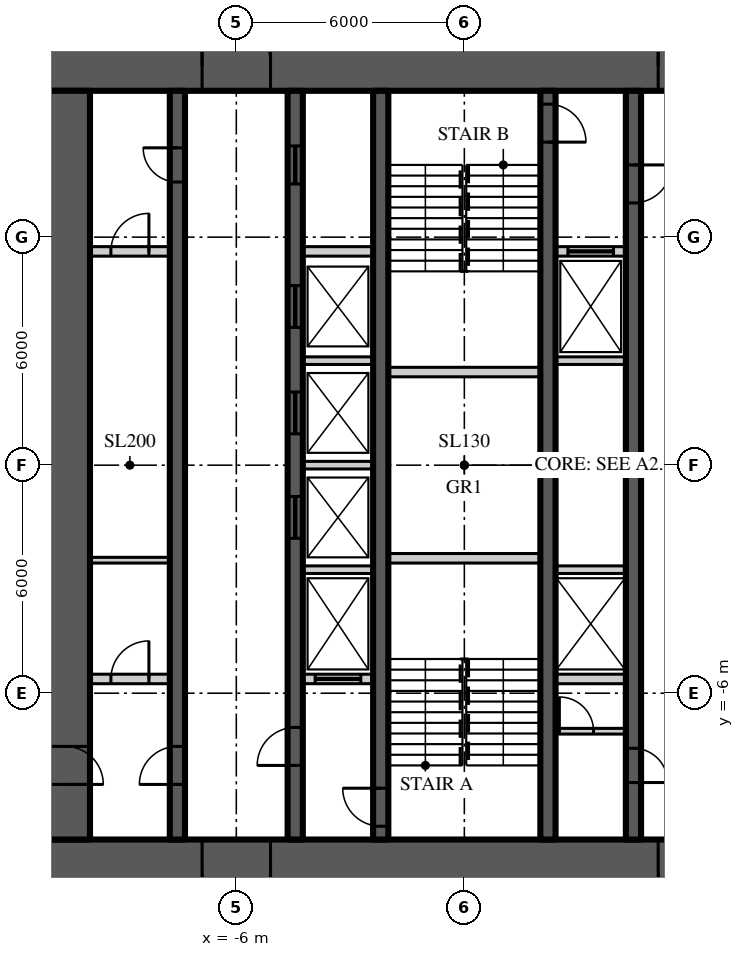
"""IFC4 building model, lengths in metres.
Left out: names, types, materials, properties, quantities, classifications, styles, units other than length and angle.
Written with IfcOpenShell. Run it as: python <this file> out.ifc"""

import sys

from ifc_helpers import new_model, si_unit, direction, frame, frame_2d, origin, place, context, subcontext, project, spatial, rectangle, extrude, element, fill, save


model = new_model("IFC4")
c1 = context("Model", 3, precision=1e-05, world=origin(), true_north=direction((0.0, 1.0)))
c2 = subcontext(c1, "Body", "Model", "MODEL_VIEW")
j1 = project(units=[si_unit("LENGTHUNIT", "METRE"), si_unit("PLANEANGLEUNIT", "RADIAN")], contexts=[c1])
p1 = place(None, origin())
s1 = spatial("IfcSite", under=j1, at=p1, CompositionType="ELEMENT")
p2 = place(p1, origin())
s2 = spatial("IfcBuilding", under=s1, at=p2, CompositionType="ELEMENT")
p3 = place(p2, frame((0.0, 0.0, 128.1)))
s3 = spatial("IfcBuildingStorey", under=s2, at=p3, CompositionType="ELEMENT", Elevation=128.1)
p4 = place(p3, frame((-11.15, 10.5, 0.0), z_axis=(0.0, 0.0, 1.0), x_axis=(1.0, 0.0, 0.0)))
e1 = element("IfcWall", 1, at=p4, inside=s3, PredefinedType="SHEAR", context=c2, shape_type="SweptSolid", body=[
    extrude(rectangle(XDim=22.3, YDim=1.3, at=frame_2d((11.15, 0.0))), origin(), (0.0, 0.0, 1.0), 3.9),
])
p5 = place(p4, frame((4.25, 0.0, 0.0)))
e2 = element("IfcOpeningElement", 2, at=p5, cuts=e1, PredefinedType="OPENING", context=c2, shape_type="SweptSolid", body=[
    extrude(rectangle(XDim=1.8, YDim=2.2, at=frame_2d((0.9, 1.1))), frame((0.0, 0.66, 0.0), z_axis=(0.0, -1.0, 0.0), x_axis=(1.0, 0.0, 0.0)), (0.0, 0.0, 1.0), 1.32),
])
p6 = place(p4, frame((16.25, 0.0, 0.0)))
e3 = element("IfcOpeningElement", 3, at=p6, cuts=e1, PredefinedType="OPENING", context=c2, shape_type="SweptSolid", body=[
    extrude(rectangle(XDim=1.8, YDim=2.2, at=frame_2d((0.9, 1.1))), frame((0.0, 0.66, 0.0), z_axis=(0.0, -1.0, 0.0), x_axis=(1.0, 0.0, 0.0)), (0.0, 0.0, 1.0), 1.32),
])
p7 = place(p3, frame((11.15, -10.5, 0.0), z_axis=(0.0, 0.0, 1.0), x_axis=(-1.0, 0.0, 0.0)))
e4 = element("IfcWall", 4, at=p7, inside=s3, PredefinedType="SHEAR", context=c2, shape_type="SweptSolid", body=[
    extrude(rectangle(XDim=22.3, YDim=1.3, at=frame_2d((11.15, 0.0))), origin(), (0.0, 0.0, 1.0), 3.9),
])
p8 = place(p7, frame((16.25, 0.0, 0.0)))
e5 = element("IfcOpeningElement", 5, at=p8, cuts=e4, PredefinedType="OPENING", context=c2, shape_type="SweptSolid", body=[
    extrude(rectangle(XDim=1.8, YDim=2.2, at=frame_2d((0.9, 1.1))), frame((0.0, 0.66, 0.0), z_axis=(0.0, -1.0, 0.0), x_axis=(1.0, 0.0, 0.0)), (0.0, 0.0, 1.0), 1.32),
])
p9 = place(p7, frame((4.25, 0.0, 0.0)))
e6 = element("IfcOpeningElement", 6, at=p9, cuts=e4, PredefinedType="OPENING", context=c2, shape_type="SweptSolid", body=[
    extrude(rectangle(XDim=1.8, YDim=2.2, at=frame_2d((0.9, 1.1))), frame((0.0, 0.66, 0.0), z_axis=(0.0, -1.0, 0.0), x_axis=(1.0, 0.0, 0.0)), (0.0, 0.0, 1.0), 1.32),
])
p10 = place(p3, frame((-10.5, 9.85, 0.0), z_axis=(0.0, 0.0, 1.0), x_axis=(0.0, -1.0, 0.0)))
e7 = element("IfcWall", 7, at=p10, inside=s3, PredefinedType="SHEAR", context=c2, shape_type="SweptSolid", body=[
    extrude(rectangle(XDim=19.7, YDim=1.3, at=frame_2d((9.85, 0.0))), origin(), (0.0, 0.0, 1.0), 3.9),
])
p11 = place(p10, frame((17.25, 0.0, 0.0)))
e8 = element("IfcOpeningElement", 8, at=p11, cuts=e7, PredefinedType="OPENING", context=c2, shape_type="SweptSolid", body=[
    extrude(rectangle(XDim=1.0, YDim=2.2, at=frame_2d((0.5, 1.1))), frame((0.0, 0.66, 0.0), z_axis=(0.0, -1.0, 0.0), x_axis=(1.0, 0.0, 0.0)), (0.0, 0.0, 1.0), 1.32),
])
p12 = place(p3, frame((-7.55, -9.85, 0.0), z_axis=(0.0, 0.0, 1.0), x_axis=(0.0, 1.0, 0.0)))
e9 = element("IfcWall", 9, at=p12, inside=s3, PredefinedType="SHEAR", context=c2, shape_type="SweptSolid", body=[
    extrude(rectangle(XDim=19.7, YDim=0.4, at=frame_2d((9.85, 0.0))), origin(), (0.0, 0.0, 1.0), 3.9),
])
p13 = place(p12, frame((1.45, 0.0, 0.0)))
e10 = element("IfcOpeningElement", 10, at=p13, cuts=e9, PredefinedType="OPENING", context=c2, shape_type="SweptSolid", body=[
    extrude(rectangle(XDim=1.0, YDim=2.2, at=frame_2d((0.5, 1.1))), frame((0.0, 0.21, 0.0), z_axis=(0.0, -1.0, 0.0), x_axis=(1.0, 0.0, 0.0)), (0.0, 0.0, 1.0), 0.42),
])
p14 = place(p12, frame((17.3, 0.0, 0.0)))
e11 = element("IfcOpeningElement", 11, at=p14, cuts=e9, PredefinedType="OPENING", context=c2, shape_type="SweptSolid", body=[
    extrude(rectangle(XDim=0.9, YDim=2.1, at=frame_2d((0.45, 1.05))), frame((0.0, 0.21, 0.0), z_axis=(0.0, -1.0, 0.0), x_axis=(1.0, 0.0, 0.0)), (0.0, 0.0, 1.0), 0.42),
])
p15 = place(p3, frame((-4.45, -9.85, 0.0), z_axis=(0.0, 0.0, 1.0), x_axis=(0.0, 1.0, 0.0)))
e12 = element("IfcWall", 12, at=p15, inside=s3, PredefinedType="SHEAR", context=c2, shape_type="SweptSolid", body=[
    extrude(rectangle(XDim=19.7, YDim=0.4, at=frame_2d((9.85, 0.0))), origin(), (0.0, 0.0, 1.0), 3.9),
])
p16 = place(p15, frame((1.95, 0.0, 0.0)))
e13 = element("IfcOpeningElement", 13, at=p16, cuts=e12, PredefinedType="OPENING", context=c2, shape_type="SweptSolid", body=[
    extrude(rectangle(XDim=1.0, YDim=2.2, at=frame_2d((0.5, 1.1))), frame((0.0, 0.21, 0.0), z_axis=(0.0, -1.0, 0.0), x_axis=(1.0, 0.0, 0.0)), (0.0, 0.0, 1.0), 0.42),
])
p17 = place(p15, frame((17.25, 0.0, 0.0)))
e14 = element("IfcOpeningElement", 14, at=p17, cuts=e12, PredefinedType="OPENING", context=c2, shape_type="SweptSolid", body=[
    extrude(rectangle(XDim=1.0, YDim=2.1, at=frame_2d((0.5, 1.05))), frame((0.0, 0.21, 0.0), z_axis=(0.0, -1.0, 0.0), x_axis=(1.0, 0.0, 0.0)), (0.0, 0.0, 1.0), 0.42),
])
p18 = place(p15, frame((7.925, 0.0, 0.0)))
e15 = element("IfcOpeningElement", 15, at=p18, cuts=e12, PredefinedType="OPENING", context=c2, shape_type="SweptSolid", body=[
    extrude(rectangle(XDim=1.1, YDim=2.2, at=frame_2d((0.55, 1.1))), frame((0.0, 0.21, 0.0), z_axis=(0.0, -1.0, 0.0), x_axis=(1.0, 0.0, 0.0)), (0.0, 0.0, 1.0), 0.42),
])
p19 = place(p15, frame((10.675, 0.0, 0.0)))
e16 = element("IfcOpeningElement", 16, at=p19, cuts=e12, PredefinedType="OPENING", context=c2, shape_type="SweptSolid", body=[
    extrude(rectangle(XDim=1.1, YDim=2.2, at=frame_2d((0.55, 1.1))), frame((0.0, 0.21, 0.0), z_axis=(0.0, -1.0, 0.0), x_axis=(1.0, 0.0, 0.0)), (0.0, 0.0, 1.0), 0.42),
])
p20 = place(p15, frame((13.475, 0.0, 0.0)))
e17 = element("IfcOpeningElement", 17, at=p20, cuts=e12, PredefinedType="OPENING", context=c2, shape_type="SweptSolid", body=[
    extrude(rectangle(XDim=1.1, YDim=2.2, at=frame_2d((0.55, 1.1))), frame((0.0, 0.21, 0.0), z_axis=(0.0, -1.0, 0.0), x_axis=(1.0, 0.0, 0.0)), (0.0, 0.0, 1.0), 0.42),
])
p21 = place(p3, frame((4.45, 9.85, 0.0), z_axis=(0.0, 0.0, 1.0), x_axis=(0.0, -1.0, 0.0)))
e18 = element("IfcWall", 18, at=p21, inside=s3, PredefinedType="SHEAR", context=c2, shape_type="SweptSolid", body=[
    extrude(rectangle(XDim=19.7, YDim=0.4, at=frame_2d((9.85, 0.0))), origin(), (0.0, 0.0, 1.0), 3.9),
])
p22 = place(p21, frame((1.95, 0.0, 0.0)))
e19 = element("IfcOpeningElement", 19, at=p22, cuts=e18, PredefinedType="OPENING", context=c2, shape_type="SweptSolid", body=[
    extrude(rectangle(XDim=1.0, YDim=2.2, at=frame_2d((0.5, 1.1))), frame((0.0, 0.21, 0.0), z_axis=(0.0, -1.0, 0.0), x_axis=(1.0, 0.0, 0.0)), (0.0, 0.0, 1.0), 0.42),
])
p23 = place(p21, frame((17.3, 0.0, 0.0)))
e20 = element("IfcOpeningElement", 20, at=p23, cuts=e18, PredefinedType="OPENING", context=c2, shape_type="SweptSolid", body=[
    extrude(rectangle(XDim=0.9, YDim=2.1, at=frame_2d((0.45, 1.05))), frame((0.0, 0.21, 0.0), z_axis=(0.0, -1.0, 0.0), x_axis=(1.0, 0.0, 0.0)), (0.0, 0.0, 1.0), 0.42),
])
p24 = place(p3, frame((-2.2, -9.85, 0.0), z_axis=(0.0, 0.0, 1.0), x_axis=(0.0, 1.0, 0.0)))
e21 = element("IfcWall", 21, at=p24, inside=s3, PredefinedType="SHEAR", context=c2, shape_type="SweptSolid", body=[
    extrude(rectangle(XDim=19.7, YDim=0.4, at=frame_2d((9.85, 0.0))), origin(), (0.0, 0.0, 1.0), 3.9),
])
p25 = place(p24, frame((0.35, 0.0, 0.0)))
e22 = element("IfcOpeningElement", 22, at=p25, cuts=e21, PredefinedType="OPENING", context=c2, shape_type="SweptSolid", body=[
    extrude(rectangle(XDim=1.0, YDim=2.2, at=frame_2d((0.5, 1.1))), frame((0.0, 0.21, 0.0), z_axis=(0.0, -1.0, 0.0), x_axis=(1.0, 0.0, 0.0)), (0.0, 0.0, 1.0), 0.42),
])
p26 = place(p3, frame((2.2, 9.85, 0.0), z_axis=(0.0, 0.0, 1.0), x_axis=(0.0, -1.0, 0.0)))
e23 = element("IfcWall", 23, at=p26, inside=s3, PredefinedType="SHEAR", context=c2, shape_type="SweptSolid", body=[
    extrude(rectangle(XDim=19.7, YDim=0.4, at=frame_2d((9.85, 0.0))), origin(), (0.0, 0.0, 1.0), 3.9),
])
p27 = place(p26, frame((0.35, 0.0, 0.0)))
e24 = element("IfcOpeningElement", 24, at=p27, cuts=e23, PredefinedType="OPENING", context=c2, shape_type="SweptSolid", body=[
    extrude(rectangle(XDim=1.0, YDim=2.2, at=frame_2d((0.5, 1.1))), frame((0.0, 0.21, 0.0), z_axis=(0.0, -1.0, 0.0), x_axis=(1.0, 0.0, 0.0)), (0.0, 0.0, 1.0), 0.42),
])
p28 = place(p3, frame((-9.85, 5.625, 0.0), z_axis=(0.0, 0.0, 1.0), x_axis=(1.0, 0.0, 0.0)))
e25 = element("IfcWall", 25, at=p28, inside=s3, PredefinedType="SOLIDWALL", context=c2, shape_type="SweptSolid", body=[
    extrude(rectangle(XDim=2.1, YDim=0.25, at=frame_2d((1.05, 0.0))), origin(), (0.0, 0.0, 1.0), 3.7),
])
p29 = place(p28, frame((0.55, 0.0, 0.0)))
e26 = element("IfcOpeningElement", 26, at=p29, cuts=e25, PredefinedType="OPENING", context=c2, shape_type="SweptSolid", body=[
    extrude(rectangle(XDim=1.0, YDim=2.2, at=frame_2d((0.5, 1.1))), frame((0.0, 0.135, 0.0), z_axis=(0.0, -1.0, 0.0), x_axis=(1.0, 0.0, 0.0)), (0.0, 0.0, 1.0), 0.27),
])
p30 = place(p3, frame((-4.25, 5.625, 0.0), z_axis=(0.0, 0.0, 1.0), x_axis=(1.0, 0.0, 0.0)))
e27 = element("IfcWall", 27, at=p30, inside=s3, PredefinedType="SOLIDWALL", context=c2, shape_type="SweptSolid", body=[
    extrude(rectangle(XDim=1.85, YDim=0.25, at=frame_2d((0.925, 0.0))), origin(), (0.0, 0.0, 1.0), 3.7),
])
p31 = place(p3, frame((2.4, 5.625, 0.0), z_axis=(0.0, 0.0, 1.0), x_axis=(1.0, 0.0, 0.0)))
e28 = element("IfcWall", 28, at=p31, inside=s3, PredefinedType="SOLIDWALL", context=c2, shape_type="SweptSolid", body=[
    extrude(rectangle(XDim=1.85, YDim=0.25, at=frame_2d((0.925, 0.0))), origin(), (0.0, 0.0, 1.0), 3.7),
])
p32 = place(p31, frame((0.325, 0.0, 0.0)))
e29 = element("IfcOpeningElement", 29, at=p32, cuts=e28, PredefinedType="OPENING", context=c2, shape_type="SweptSolid", body=[
    extrude(rectangle(XDim=1.2, YDim=2.2, at=frame_2d((0.6, 1.1))), frame((0.0, 0.135, 0.0), z_axis=(0.0, -1.0, 0.0), x_axis=(1.0, 0.0, 0.0)), (0.0, 0.0, 1.0), 0.27),
])
p33 = place(p3, frame((-9.85, -5.625, 0.0), z_axis=(0.0, 0.0, 1.0), x_axis=(1.0, 0.0, 0.0)))
e30 = element("IfcWall", 30, at=p33, inside=s3, PredefinedType="SOLIDWALL", context=c2, shape_type="SweptSolid", body=[
    extrude(rectangle(XDim=2.1, YDim=0.25, at=frame_2d((1.05, 0.0))), origin(), (0.0, 0.0, 1.0), 3.7),
])
p34 = place(p33, frame((0.55, 0.0, 0.0)))
e31 = element("IfcOpeningElement", 31, at=p34, cuts=e30, PredefinedType="OPENING", context=c2, shape_type="SweptSolid", body=[
    extrude(rectangle(XDim=1.0, YDim=2.2, at=frame_2d((0.5, 1.1))), frame((0.0, 0.135, 0.0), z_axis=(0.0, -1.0, 0.0), x_axis=(1.0, 0.0, 0.0)), (0.0, 0.0, 1.0), 0.27),
])
p35 = place(p3, frame((-4.25, -5.625, 0.0), z_axis=(0.0, 0.0, 1.0), x_axis=(1.0, 0.0, 0.0)))
e32 = element("IfcWall", 32, at=p35, inside=s3, PredefinedType="SOLIDWALL", context=c2, shape_type="SweptSolid", body=[
    extrude(rectangle(XDim=1.85, YDim=0.25, at=frame_2d((0.925, 0.0))), origin(), (0.0, 0.0, 1.0), 3.7),
])
p36 = place(p35, frame((0.325, 0.0, 0.0)))
e33 = element("IfcOpeningElement", 33, at=p36, cuts=e32, PredefinedType="OPENING", context=c2, shape_type="SweptSolid", body=[
    extrude(rectangle(XDim=1.2, YDim=2.2, at=frame_2d((0.6, 1.1))), frame((0.0, 0.135, 0.0), z_axis=(0.0, -1.0, 0.0), x_axis=(1.0, 0.0, 0.0)), (0.0, 0.0, 1.0), 0.27),
])
p37 = place(p3, frame((2.4, -5.625, 0.0), z_axis=(0.0, 0.0, 1.0), x_axis=(1.0, 0.0, 0.0)))
e34 = element("IfcWall", 34, at=p37, inside=s3, PredefinedType="SOLIDWALL", context=c2, shape_type="SweptSolid", body=[
    extrude(rectangle(XDim=1.85, YDim=0.25, at=frame_2d((0.925, 0.0))), origin(), (0.0, 0.0, 1.0), 3.7),
])
for number, where, z_axis, x_axis in (
    (35, (-2.0, -2.45, 0.0), (0.0, 0.0, 1.0), (1.0, 0.0, 0.0)),
    (36, (-2.0, 2.45, 0.0), (0.0, 0.0, 1.0), (1.0, 0.0, 0.0)),
):
    element("IfcWall", number, at=place(p3, frame(where, z_axis=z_axis, x_axis=x_axis)), inside=s3, PredefinedType="SOLIDWALL", context=c2, shape_type="SweptSolid", body=[
        extrude(rectangle(XDim=4.0, YDim=0.25, at=frame_2d((2.0, 0.0))), origin(), (0.0, 0.0, 1.0), 3.7),
    ])
for number, where, z_axis, x_axis in (
    (37, (-4.25, -2.75, 0.0), (0.0, 0.0, 1.0), (1.0, 0.0, 0.0)),
    (38, (2.4, -2.75, 0.0), (0.0, 0.0, 1.0), (1.0, 0.0, 0.0)),
    (39, (-4.25, 0.0, 0.0), (0.0, 0.0, 1.0), (1.0, 0.0, 0.0)),
    (40, (-4.25, 2.75, 0.0), (0.0, 0.0, 1.0), (1.0, 0.0, 0.0)),
    (41, (2.4, 2.75, 0.0), (0.0, 0.0, 1.0), (1.0, 0.0, 0.0)),
):
    element("IfcWall", number, at=place(p3, frame(where, z_axis=z_axis, x_axis=x_axis)), inside=s3, PredefinedType="SOLIDWALL", context=c2, shape_type="SweptSolid", body=[
        extrude(rectangle(XDim=1.85, YDim=0.2, at=frame_2d((0.925, 0.0))), origin(), (0.0, 0.0, 1.0), 3.7),
    ])
p38 = place(p3, frame((-9.85, -2.5, 0.0), z_axis=(0.0, 0.0, 1.0), x_axis=(1.0, 0.0, 0.0)))
e42 = element("IfcWall", 42, at=p38, inside=s3, PredefinedType="SOLIDWALL", context=c2, shape_type="SweptSolid", body=[
    extrude(rectangle(XDim=2.1, YDim=0.15, at=frame_2d((1.05, 0.0))), origin(), (0.0, 0.0, 1.0), 3.77),
])
p39 = place(p3, frame((2.4, -7.0, 0.0), z_axis=(0.0, 0.0, 1.0), x_axis=(1.0, 0.0, 0.0)))
e43 = element("IfcWall", 43, at=p39, inside=s3, PredefinedType="SOLIDWALL", context=c2, shape_type="SweptSolid", body=[
    extrude(rectangle(XDim=1.85, YDim=0.15, at=frame_2d((0.925, 0.0))), origin(), (0.0, 0.0, 1.0), 3.77),
])
p40 = place(p39, frame((0.1, 0.0, 0.0)))
e44 = element("IfcOpeningElement", 44, at=p40, cuts=e43, PredefinedType="OPENING", context=c2, shape_type="SweptSolid", body=[
    extrude(rectangle(XDim=0.9, YDim=2.1, at=frame_2d((0.45, 1.05))), frame((0.0, 0.085, 0.0), z_axis=(0.0, -1.0, 0.0), x_axis=(1.0, 0.0, 0.0)), (0.0, 0.0, 1.0), 0.17),
])
p41 = place(p5, origin())
e45 = element("IfcDoor", 45, at=p41, inside=s3, OperationType="DOUBLE_DOOR_DOUBLE_SWING", PredefinedType="DOOR", context=c2, shape_type="SweptSolid", body=[
    extrude(rectangle(XDim=1.8, YDim=2.2, at=frame_2d((0.9, 1.1))), frame((0.0, 0.025, 0.0), z_axis=(0.0, -1.0, 0.0), x_axis=(1.0, 0.0, 0.0)), (0.0, 0.0, 1.0), 0.05),
])
fill(e2, e45)
p42 = place(p8, origin())
e46 = element("IfcDoor", 46, at=p42, inside=s3, OperationType="DOUBLE_DOOR_DOUBLE_SWING", PredefinedType="DOOR", context=c2, shape_type="SweptSolid", body=[
    extrude(rectangle(XDim=1.8, YDim=2.2, at=frame_2d((0.9, 1.1))), frame((0.0, 0.025, 0.0), z_axis=(0.0, -1.0, 0.0), x_axis=(1.0, 0.0, 0.0)), (0.0, 0.0, 1.0), 0.05),
])
fill(e5, e46)
p43 = place(p6, origin())
e47 = element("IfcDoor", 47, at=p43, inside=s3, OperationType="DOUBLE_DOOR_DOUBLE_SWING", PredefinedType="DOOR", context=c2, shape_type="SweptSolid", body=[
    extrude(rectangle(XDim=1.8, YDim=2.2, at=frame_2d((0.9, 1.1))), frame((0.0, 0.025, 0.0), z_axis=(0.0, -1.0, 0.0), x_axis=(1.0, 0.0, 0.0)), (0.0, 0.0, 1.0), 0.05),
])
fill(e3, e47)
p44 = place(p9, origin())
e48 = element("IfcDoor", 48, at=p44, inside=s3, OperationType="DOUBLE_DOOR_DOUBLE_SWING", PredefinedType="DOOR", context=c2, shape_type="SweptSolid", body=[
    extrude(rectangle(XDim=1.8, YDim=2.2, at=frame_2d((0.9, 1.1))), frame((0.0, 0.025, 0.0), z_axis=(0.0, -1.0, 0.0), x_axis=(1.0, 0.0, 0.0)), (0.0, 0.0, 1.0), 0.05),
])
fill(e6, e48)
p45 = place(p13, origin())
e49 = element("IfcDoor", 49, at=p45, inside=s3, OperationType="SINGLE_SWING_LEFT", PredefinedType="DOOR", context=c2, shape_type="SweptSolid", body=[
    extrude(rectangle(XDim=1.0, YDim=2.2, at=frame_2d((0.5, 1.1))), frame((0.0, 0.025, 0.0), z_axis=(0.0, -1.0, 0.0), x_axis=(1.0, 0.0, 0.0)), (0.0, 0.0, 1.0), 0.05),
])
fill(e10, e49)
p46 = place(p11, origin())
e50 = element("IfcDoor", 50, at=p46, inside=s3, OperationType="SINGLE_SWING_RIGHT", PredefinedType="DOOR", context=c2, shape_type="SweptSolid", body=[
    extrude(rectangle(XDim=1.0, YDim=2.2, at=frame_2d((0.5, 1.1))), frame((0.0, 0.025, 0.0), z_axis=(0.0, -1.0, 0.0), x_axis=(1.0, 0.0, 0.0)), (0.0, 0.0, 1.0), 0.05),
])
fill(e8, e50)
p47 = place(p16, origin())
e51 = element("IfcDoor", 51, at=p47, inside=s3, OperationType="SINGLE_SWING_LEFT", PredefinedType="DOOR", context=c2, shape_type="SweptSolid", body=[
    extrude(rectangle(XDim=1.0, YDim=2.2, at=frame_2d((0.5, 1.1))), frame((0.0, 0.025, 0.0), z_axis=(0.0, -1.0, 0.0), x_axis=(1.0, 0.0, 0.0)), (0.0, 0.0, 1.0), 0.05),
])
fill(e13, e51)
p48 = place(p25, origin())
e52 = element("IfcDoor", 52, at=p48, inside=s3, OperationType="SINGLE_SWING_RIGHT", PredefinedType="DOOR", context=c2, shape_type="SweptSolid", body=[
    extrude(rectangle(XDim=1.0, YDim=2.2, at=frame_2d((0.5, 1.1))), frame((0.0, 0.025, 0.0), z_axis=(0.0, -1.0, 0.0), x_axis=(1.0, 0.0, 0.0)), (0.0, 0.0, 1.0), 0.05),
])
fill(e22, e52)
p49 = place(p22, origin())
e53 = element("IfcDoor", 53, at=p49, inside=s3, OperationType="SINGLE_SWING_LEFT", PredefinedType="DOOR", context=c2, shape_type="SweptSolid", body=[
    extrude(rectangle(XDim=1.0, YDim=2.2, at=frame_2d((0.5, 1.1))), frame((0.0, 0.025, 0.0), z_axis=(0.0, -1.0, 0.0), x_axis=(1.0, 0.0, 0.0)), (0.0, 0.0, 1.0), 0.05),
])
fill(e19, e53)
p50 = place(p27, origin())
e54 = element("IfcDoor", 54, at=p50, inside=s3, OperationType="SINGLE_SWING_RIGHT", PredefinedType="DOOR", context=c2, shape_type="SweptSolid", body=[
    extrude(rectangle(XDim=1.0, YDim=2.2, at=frame_2d((0.5, 1.1))), frame((0.0, 0.025, 0.0), z_axis=(0.0, -1.0, 0.0), x_axis=(1.0, 0.0, 0.0)), (0.0, 0.0, 1.0), 0.05),
])
fill(e24, e54)
p51 = place(p14, origin())
e55 = element("IfcDoor", 55, at=p51, inside=s3, OperationType="SINGLE_SWING_RIGHT", PredefinedType="DOOR", context=c2, shape_type="SweptSolid", body=[
    extrude(rectangle(XDim=0.9, YDim=2.1, at=frame_2d((0.45, 1.05))), frame((0.0, 0.025, 0.0), z_axis=(0.0, -1.0, 0.0), x_axis=(1.0, 0.0, 0.0)), (0.0, 0.0, 1.0), 0.05),
])
fill(e11, e55)
p52 = place(p17, origin())
e56 = element("IfcDoor", 56, at=p52, inside=s3, OperationType="SLIDING_TO_LEFT", PredefinedType="DOOR", context=c2, shape_type="SweptSolid", body=[
    extrude(rectangle(XDim=1.0, YDim=2.1, at=frame_2d((0.5, 1.05))), frame((0.0, 0.025, 0.0), z_axis=(0.0, -1.0, 0.0), x_axis=(1.0, 0.0, 0.0)), (0.0, 0.0, 1.0), 0.05),
])
fill(e14, e56)
p53 = place(p23, origin())
e57 = element("IfcDoor", 57, at=p53, inside=s3, OperationType="SINGLE_SWING_RIGHT", PredefinedType="DOOR", context=c2, shape_type="SweptSolid", body=[
    extrude(rectangle(XDim=0.9, YDim=2.1, at=frame_2d((0.45, 1.05))), frame((0.0, 0.025, 0.0), z_axis=(0.0, -1.0, 0.0), x_axis=(1.0, 0.0, 0.0)), (0.0, 0.0, 1.0), 0.05),
])
fill(e20, e57)
p54 = place(p18, origin())
e58 = element("IfcDoor", 58, at=p54, inside=s3, OperationType="SLIDING_TO_LEFT", PredefinedType="DOOR", context=c2, shape_type="SweptSolid", body=[
    extrude(rectangle(XDim=1.1, YDim=2.2, at=frame_2d((0.55, 1.1))), frame((0.0, 0.025, 0.0), z_axis=(0.0, -1.0, 0.0), x_axis=(1.0, 0.0, 0.0)), (0.0, 0.0, 1.0), 0.05),
])
fill(e15, e58)
p55 = place(p19, origin())
e59 = element("IfcDoor", 59, at=p55, inside=s3, OperationType="SLIDING_TO_LEFT", PredefinedType="DOOR", context=c2, shape_type="SweptSolid", body=[
    extrude(rectangle(XDim=1.1, YDim=2.2, at=frame_2d((0.55, 1.1))), frame((0.0, 0.025, 0.0), z_axis=(0.0, -1.0, 0.0), x_axis=(1.0, 0.0, 0.0)), (0.0, 0.0, 1.0), 0.05),
])
fill(e16, e59)
p56 = place(p20, origin())
e60 = element("IfcDoor", 60, at=p56, inside=s3, OperationType="SLIDING_TO_LEFT", PredefinedType="DOOR", context=c2, shape_type="SweptSolid", body=[
    extrude(rectangle(XDim=1.1, YDim=2.2, at=frame_2d((0.55, 1.1))), frame((0.0, 0.025, 0.0), z_axis=(0.0, -1.0, 0.0), x_axis=(1.0, 0.0, 0.0)), (0.0, 0.0, 1.0), 0.05),
])
fill(e17, e60)
p57 = place(p36, origin())
e61 = element("IfcDoor", 61, at=p57, inside=s3, OperationType="SLIDING_TO_LEFT", PredefinedType="DOOR", context=c2, shape_type="SweptSolid", body=[
    extrude(rectangle(XDim=1.2, YDim=2.2, at=frame_2d((0.6, 1.1))), frame((0.0, 0.025, 0.0), z_axis=(0.0, -1.0, 0.0), x_axis=(1.0, 0.0, 0.0)), (0.0, 0.0, 1.0), 0.05),
])
fill(e33, e61)
p58 = place(p32, origin())
e62 = element("IfcDoor", 62, at=p58, inside=s3, OperationType="SLIDING_TO_LEFT", PredefinedType="DOOR", context=c2, shape_type="SweptSolid", body=[
    extrude(rectangle(XDim=1.2, YDim=2.2, at=frame_2d((0.6, 1.1))), frame((0.0, 0.025, 0.0), z_axis=(0.0, -1.0, 0.0), x_axis=(1.0, 0.0, 0.0)), (0.0, 0.0, 1.0), 0.05),
])
fill(e29, e62)
p59 = place(p29, origin())
e63 = element("IfcDoor", 63, at=p59, inside=s3, OperationType="SINGLE_SWING_RIGHT", PredefinedType="DOOR", context=c2, shape_type="SweptSolid", body=[
    extrude(rectangle(XDim=1.0, YDim=2.2, at=frame_2d((0.5, 1.1))), frame((0.0, 0.025, 0.0), z_axis=(0.0, -1.0, 0.0), x_axis=(1.0, 0.0, 0.0)), (0.0, 0.0, 1.0), 0.05),
])
fill(e26, e63)
p60 = place(p34, origin())
e64 = element("IfcDoor", 64, at=p60, inside=s3, OperationType="SINGLE_SWING_RIGHT", PredefinedType="DOOR", context=c2, shape_type="SweptSolid", body=[
    extrude(rectangle(XDim=1.0, YDim=2.2, at=frame_2d((0.5, 1.1))), frame((0.0, 0.025, 0.0), z_axis=(0.0, -1.0, 0.0), x_axis=(1.0, 0.0, 0.0)), (0.0, 0.0, 1.0), 0.05),
])
fill(e31, e64)
p61 = place(p40, origin())
e65 = element("IfcDoor", 65, at=p61, inside=s3, OperationType="SINGLE_SWING_LEFT", PredefinedType="DOOR", context=c2, shape_type="SweptSolid", body=[
    extrude(rectangle(XDim=0.9, YDim=2.1, at=frame_2d((0.45, 1.05))), frame((0.0, 0.025, 0.0), z_axis=(0.0, -1.0, 0.0), x_axis=(1.0, 0.0, 0.0)), (0.0, 0.0, 1.0), 0.05),
])
fill(e44, e65)
save(model, sys.argv[1])
